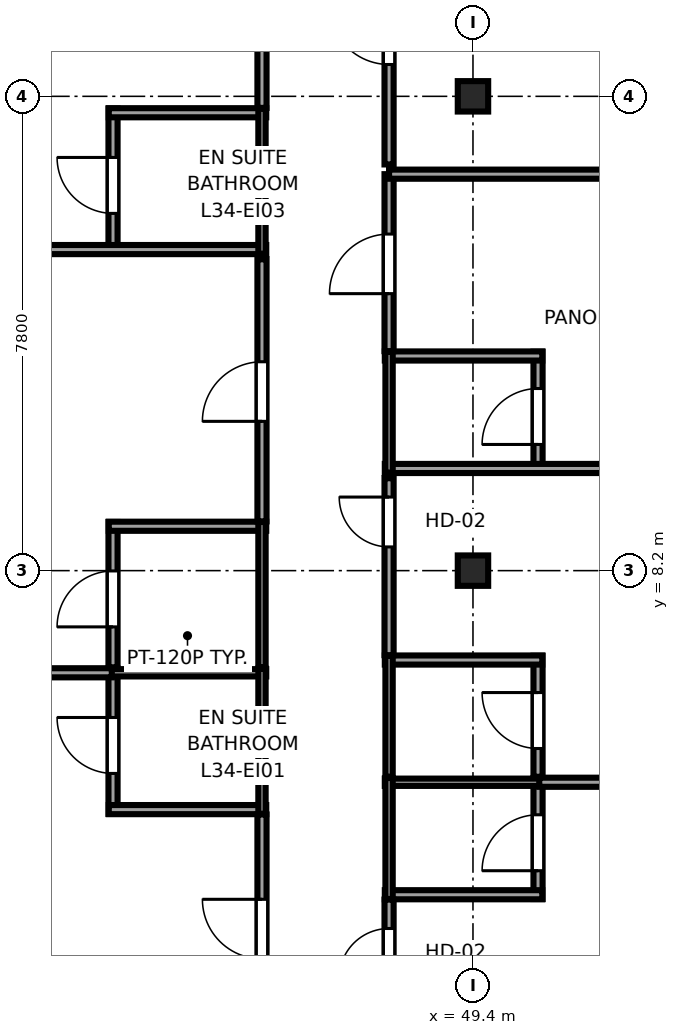
"""IFC4 building model, lengths in metres.
Left out: names, types, materials, properties, quantities, classifications, styles, units other than length and angle.
Written with IfcOpenShell. Run it as: python <this file> out.ifc"""

import sys

from ifc_helpers import new_model, si_unit, direction, frame, frame_2d, origin, origin_2d, place, context, subcontext, project, spatial, rectangle, i_section, extrude, source, transform, mapped, element, fill, save


model = new_model("IFC4")
c1 = context("Model", 3, precision=1e-05, world=origin(), true_north=direction((0.0, 1.0)))
c2 = subcontext(c1, "Body", "Model", "MODEL_VIEW")
j1 = project(units=[si_unit("LENGTHUNIT", "METRE"), si_unit("PLANEANGLEUNIT", "RADIAN")], contexts=[c1])
p1 = place(None, origin())
s1 = spatial("IfcSite", under=j1, at=p1, CompositionType="ELEMENT")
p2 = place(p1, origin())
s2 = spatial("IfcBuilding", under=s1, at=p2, CompositionType="ELEMENT")
p3 = place(p2, frame((0.0, 0.0, 132.85)))
s3 = spatial("IfcBuildingStorey", under=s2, at=p3, CompositionType="ELEMENT", Elevation=132.85)
m1 = source(origin(), c2, "Body", "SweptSolid", [
    extrude(i_section(OverallWidth=0.5, OverallDepth=0.5, WebThickness=0.022, FlangeThickness=0.034, at=origin_2d()), origin(), (0.0, 0.0, 1.0), 3.55),
])
for number, where, z_axis, x_axis in (
    (1, (49.4, 8.2, 0.0), (0.0, 0.0, 1.0), (1.0, 0.0, 0.0)),
    (2, (49.4, 16.0, 0.0), (0.0, 0.0, 1.0), (1.0, 0.0, 0.0)),
):
    element("IfcColumn", number, at=place(p3, frame(where, z_axis=z_axis, x_axis=x_axis)), inside=s3, PredefinedType="COLUMN", context=c2, shape_type="MappedRepresentation", body=[
        mapped(m1, transform((0.0, 0.0, 0.0), x_axis=(1.0, 0.0, 0.0), y_axis=(0.0, 1.0, 0.0), z_axis=(0.0, 0.0, 1.0), scale=1.0)),
    ])
p4 = place(p3, frame((43.48, 4.2, 0.0), z_axis=(0.0, 0.0, 1.0), x_axis=(0.0, 1.0, 0.0)))
e3 = element("IfcWall", 3, at=p4, inside=s3, PredefinedType="PARTITIONING", context=c2, shape_type="SweptSolid", body=[
    extrude(rectangle(XDim=2.39, YDim=0.15, at=frame_2d((1.195, 0.0))), origin(), (0.0, 0.0, 1.0), 3.37),
])
p5 = place(p4, frame((0.665, 0.0, 0.0)))
e4 = element("IfcOpeningElement", 4, at=p5, cuts=e3, PredefinedType="OPENING", context=c2, shape_type="SweptSolid", body=[
    extrude(rectangle(XDim=0.92, YDim=2.01, at=frame_2d((0.46, 1.005))), frame((0.0, 0.085, 0.0), z_axis=(0.0, -1.0, 0.0), x_axis=(1.0, 0.0, 0.0)), (0.0, 0.0, 1.0), 0.17),
])
p6 = place(p3, frame((43.41, 4.27, 0.0), z_axis=(0.0, 0.0, 1.0), x_axis=(1.0, 0.0, 0.0)))
e5 = element("IfcWall", 5, at=p6, inside=s3, PredefinedType="PARTITIONING", context=c2, shape_type="SweptSolid", body=[
    extrude(rectangle(XDim=2.59, YDim=0.15, at=frame_2d((1.295, 0.0))), origin(), (0.0, 0.0, 1.0), 3.37),
])
p7 = place(p3, frame((43.41, 6.52, 0.0), z_axis=(0.0, 0.0, 1.0), x_axis=(1.0, 0.0, 0.0)))
e6 = element("IfcWall", 6, at=p7, inside=s3, PredefinedType="PLUMBINGWALL", context=c2, shape_type="SweptSolid", body=[
    extrude(rectangle(XDim=2.59, YDim=0.12, at=frame_2d((1.295, 0.0))), origin(), (0.0, 0.0, 1.0), 3.37),
])
p8 = place(p3, frame((45.93, 4.2, 0.0), z_axis=(0.0, 0.0, 1.0), x_axis=(0.0, 1.0, 0.0)))
e7 = element("IfcWall", 7, at=p8, inside=s3, PredefinedType="PLUMBINGWALL", context=c2, shape_type="SweptSolid", body=[
    extrude(rectangle(XDim=2.39, YDim=0.12, at=frame_2d((1.195, 0.0))), origin(), (0.0, 0.0, 1.0), 3.37),
])
p9 = place(p3, frame((43.48, 6.61, 0.0), z_axis=(0.0, 0.0, 1.0), x_axis=(0.0, 1.0, 0.0)))
e8 = element("IfcWall", 8, at=p9, inside=s3, PredefinedType="PARTITIONING", context=c2, shape_type="SweptSolid", body=[
    extrude(rectangle(XDim=2.39, YDim=0.15, at=frame_2d((1.195, 0.0))), origin(), (0.0, 0.0, 1.0), 3.37),
])
p10 = place(p9, frame((0.665, 0.0, 0.0)))
e9 = element("IfcOpeningElement", 9, at=p10, cuts=e8, PredefinedType="OPENING", context=c2, shape_type="SweptSolid", body=[
    extrude(rectangle(XDim=0.92, YDim=2.01, at=frame_2d((0.46, 1.005))), frame((0.0, 0.085, 0.0), z_axis=(0.0, -1.0, 0.0), x_axis=(1.0, 0.0, 0.0)), (0.0, 0.0, 1.0), 0.17),
])
p11 = place(p3, frame((43.41, 8.93, 0.0), z_axis=(0.0, 0.0, 1.0), x_axis=(1.0, 0.0, 0.0)))
e10 = element("IfcWall", 10, at=p11, inside=s3, PredefinedType="PARTITIONING", context=c2, shape_type="SweptSolid", body=[
    extrude(rectangle(XDim=2.59, YDim=0.15, at=frame_2d((1.295, 0.0))), origin(), (0.0, 0.0, 1.0), 3.37),
])
p12 = place(p3, frame((45.93, 6.61, 0.0), z_axis=(0.0, 0.0, 1.0), x_axis=(0.0, 1.0, 0.0)))
e11 = element("IfcWall", 11, at=p12, inside=s3, PredefinedType="PLUMBINGWALL", context=c2, shape_type="SweptSolid", body=[
    extrude(rectangle(XDim=2.39, YDim=0.12, at=frame_2d((1.195, 0.0))), origin(), (0.0, 0.0, 1.0), 3.37),
])
p13 = place(p3, frame((43.48, 13.41, 0.0), z_axis=(0.0, 0.0, 1.0), x_axis=(0.0, 1.0, 0.0)))
e12 = element("IfcWall", 12, at=p13, inside=s3, PredefinedType="PARTITIONING", context=c2, shape_type="SweptSolid", body=[
    extrude(rectangle(XDim=2.39, YDim=0.15, at=frame_2d((1.195, 0.0))), origin(), (0.0, 0.0, 1.0), 3.37),
])
p14 = place(p13, frame((0.665, 0.0, 0.0)))
e13 = element("IfcOpeningElement", 13, at=p14, cuts=e12, PredefinedType="OPENING", context=c2, shape_type="SweptSolid", body=[
    extrude(rectangle(XDim=0.92, YDim=2.01, at=frame_2d((0.46, 1.005))), frame((0.0, 0.085, 0.0), z_axis=(0.0, -1.0, 0.0), x_axis=(1.0, 0.0, 0.0)), (0.0, 0.0, 1.0), 0.17),
])
p15 = place(p3, frame((34.65, 13.48, 0.0), z_axis=(0.0, 0.0, 1.0), x_axis=(1.0, 0.0, 0.0)))
e14 = element("IfcWall", 14, at=p15, inside=s3, PredefinedType="PARTITIONING", context=c2, shape_type="SweptSolid", body=[
    extrude(rectangle(XDim=11.35, YDim=0.15, at=frame_2d((5.675, 0.0))), origin(), (0.0, 0.0, 1.0), 3.37),
])
p16 = place(p3, frame((43.41, 15.73, 0.0), z_axis=(0.0, 0.0, 1.0), x_axis=(1.0, 0.0, 0.0)))
e15 = element("IfcWall", 15, at=p16, inside=s3, PredefinedType="PARTITIONING", context=c2, shape_type="SweptSolid", body=[
    extrude(rectangle(XDim=2.59, YDim=0.15, at=frame_2d((1.295, 0.0))), origin(), (0.0, 0.0, 1.0), 3.37),
])
p17 = place(p3, frame((45.93, 13.41, 0.0), z_axis=(0.0, 0.0, 1.0), x_axis=(0.0, 1.0, 0.0)))
e16 = element("IfcWall", 16, at=p17, inside=s3, PredefinedType="PLUMBINGWALL", context=c2, shape_type="SweptSolid", body=[
    extrude(rectangle(XDim=2.39, YDim=0.12, at=frame_2d((1.195, 0.0))), origin(), (0.0, 0.0, 1.0), 3.37),
])
p18 = place(p3, frame((50.47, 2.8, 0.0), z_axis=(0.0, 0.0, 1.0), x_axis=(0.0, 1.0, 0.0)))
e17 = element("IfcWall", 17, at=p18, inside=s3, PredefinedType="PARTITIONING", context=c2, shape_type="SweptSolid", body=[
    extrude(rectangle(XDim=1.99, YDim=0.15, at=frame_2d((0.995, 0.0))), origin(), (0.0, 0.0, 1.0), 3.37),
])
p19 = place(p18, frame((0.465, 0.0, 0.0)))
e18 = element("IfcOpeningElement", 18, at=p19, cuts=e17, PredefinedType="OPENING", context=c2, shape_type="SweptSolid", body=[
    extrude(rectangle(XDim=0.92, YDim=2.01, at=frame_2d((0.46, 1.005))), frame((0.0, 0.085, 0.0), z_axis=(0.0, -1.0, 0.0), x_axis=(1.0, 0.0, 0.0)), (0.0, 0.0, 1.0), 0.17),
])
p20 = place(p3, frame((47.95, 2.87, 0.0), z_axis=(0.0, 0.0, 1.0), x_axis=(1.0, 0.0, 0.0)))
e19 = element("IfcWall", 19, at=p20, inside=s3, PredefinedType="PARTITIONING", context=c2, shape_type="SweptSolid", body=[
    extrude(rectangle(XDim=2.59, YDim=0.15, at=frame_2d((1.295, 0.0))), origin(), (0.0, 0.0, 1.0), 3.37),
])
p21 = place(p3, frame((47.95, 4.72, 0.0), z_axis=(0.0, 0.0, 1.0), x_axis=(1.0, 0.0, 0.0)))
e20 = element("IfcWall", 20, at=p21, inside=s3, PredefinedType="PLUMBINGWALL", context=c2, shape_type="SweptSolid", body=[
    extrude(rectangle(XDim=2.59, YDim=0.12, at=frame_2d((1.295, 0.0))), origin(), (0.0, 0.0, 1.0), 3.37),
])
p22 = place(p3, frame((48.02, 2.8, 0.0), z_axis=(0.0, 0.0, 1.0), x_axis=(0.0, 1.0, 0.0)))
e21 = element("IfcWall", 21, at=p22, inside=s3, PredefinedType="PLUMBINGWALL", context=c2, shape_type="SweptSolid", body=[
    extrude(rectangle(XDim=1.99, YDim=0.12, at=frame_2d((0.995, 0.0))), origin(), (0.0, 0.0, 1.0), 3.37),
])
p23 = place(p3, frame((50.47, 4.81, 0.0), z_axis=(0.0, 0.0, 1.0), x_axis=(0.0, 1.0, 0.0)))
e22 = element("IfcWall", 22, at=p23, inside=s3, PredefinedType="PARTITIONING", context=c2, shape_type="SweptSolid", body=[
    extrude(rectangle(XDim=1.99, YDim=0.15, at=frame_2d((0.995, 0.0))), origin(), (0.0, 0.0, 1.0), 3.37),
])
p24 = place(p23, frame((0.465, 0.0, 0.0)))
e23 = element("IfcOpeningElement", 23, at=p24, cuts=e22, PredefinedType="OPENING", context=c2, shape_type="SweptSolid", body=[
    extrude(rectangle(XDim=0.92, YDim=2.01, at=frame_2d((0.46, 1.005))), frame((0.0, 0.085, 0.0), z_axis=(0.0, -1.0, 0.0), x_axis=(1.0, 0.0, 0.0)), (0.0, 0.0, 1.0), 0.17),
])
p25 = place(p3, frame((47.95, 6.73, 0.0), z_axis=(0.0, 0.0, 1.0), x_axis=(1.0, 0.0, 0.0)))
e24 = element("IfcWall", 24, at=p25, inside=s3, PredefinedType="PARTITIONING", context=c2, shape_type="SweptSolid", body=[
    extrude(rectangle(XDim=2.59, YDim=0.15, at=frame_2d((1.295, 0.0))), origin(), (0.0, 0.0, 1.0), 3.37),
])
p26 = place(p3, frame((48.02, 4.81, 0.0), z_axis=(0.0, 0.0, 1.0), x_axis=(0.0, 1.0, 0.0)))
e25 = element("IfcWall", 25, at=p26, inside=s3, PredefinedType="PLUMBINGWALL", context=c2, shape_type="SweptSolid", body=[
    extrude(rectangle(XDim=1.99, YDim=0.12, at=frame_2d((0.995, 0.0))), origin(), (0.0, 0.0, 1.0), 3.37),
])
p27 = place(p3, frame((50.47, 9.81, 0.0), z_axis=(0.0, 0.0, 1.0), x_axis=(0.0, 1.0, 0.0)))
e26 = element("IfcWall", 26, at=p27, inside=s3, PredefinedType="PARTITIONING", context=c2, shape_type="SweptSolid", body=[
    extrude(rectangle(XDim=1.99, YDim=0.15, at=frame_2d((0.995, 0.0))), origin(), (0.0, 0.0, 1.0), 3.37),
])
p28 = place(p27, frame((0.465, 0.0, 0.0)))
e27 = element("IfcOpeningElement", 27, at=p28, cuts=e26, PredefinedType="OPENING", context=c2, shape_type="SweptSolid", body=[
    extrude(rectangle(XDim=0.92, YDim=2.01, at=frame_2d((0.46, 1.005))), frame((0.0, 0.085, 0.0), z_axis=(0.0, -1.0, 0.0), x_axis=(1.0, 0.0, 0.0)), (0.0, 0.0, 1.0), 0.17),
])
p29 = place(p3, frame((47.95, 9.88, 0.0), z_axis=(0.0, 0.0, 1.0), x_axis=(1.0, 0.0, 0.0)))
e28 = element("IfcWall", 28, at=p29, inside=s3, PredefinedType="PARTITIONING", context=c2, shape_type="SweptSolid", body=[
    extrude(rectangle(XDim=8.645, YDim=0.15, at=frame_2d((4.323, 0.0))), origin(), (0.0, 0.0, 1.0), 3.37),
])
p30 = place(p3, frame((47.95, 11.73, 0.0), z_axis=(0.0, 0.0, 1.0), x_axis=(1.0, 0.0, 0.0)))
e29 = element("IfcWall", 29, at=p30, inside=s3, PredefinedType="PARTITIONING", context=c2, shape_type="SweptSolid", body=[
    extrude(rectangle(XDim=2.59, YDim=0.15, at=frame_2d((1.295, 0.0))), origin(), (0.0, 0.0, 1.0), 3.37),
])
p31 = place(p3, frame((48.02, 9.81, 0.0), z_axis=(0.0, 0.0, 1.0), x_axis=(0.0, 1.0, 0.0)))
e30 = element("IfcWall", 30, at=p31, inside=s3, PredefinedType="PLUMBINGWALL", context=c2, shape_type="SweptSolid", body=[
    extrude(rectangle(XDim=1.99, YDim=0.12, at=frame_2d((0.995, 0.0))), origin(), (0.0, 0.0, 1.0), 3.37),
])
p32 = place(p3, frame((45.93, 0.405, 0.0), z_axis=(0.0, 0.0, 1.0), x_axis=(0.0, 1.0, 0.0)))
e31 = element("IfcWall", 31, at=p32, inside=s3, PredefinedType="PARTITIONING", context=c2, shape_type="SweptSolid", body=[
    extrude(rectangle(XDim=3.785, YDim=0.15, at=frame_2d((1.893, 0.0))), origin(), (0.0, 0.0, 1.0), 3.37),
])
p33 = place(p32, frame((1.41, 0.0, 0.0)))
e32 = element("IfcOpeningElement", 32, at=p33, cuts=e31, PredefinedType="OPENING", context=c2, shape_type="SweptSolid", body=[
    extrude(rectangle(XDim=0.98, YDim=2.12, at=frame_2d((0.49, 1.06))), frame((0.0, 0.085, 0.0), z_axis=(0.0, -1.0, 0.0), x_axis=(1.0, 0.0, 0.0)), (0.0, 0.0, 1.0), 0.17),
])
p34 = place(p3, frame((34.65, 6.52, 0.0), z_axis=(0.0, 0.0, 1.0), x_axis=(1.0, 0.0, 0.0)))
e33 = element("IfcWall", 33, at=p34, inside=s3, PredefinedType="PARTITIONING", context=c2, shape_type="SweptSolid", body=[
    extrude(rectangle(XDim=8.81, YDim=0.15, at=frame_2d((4.405, 0.0))), origin(), (0.0, 0.0, 1.0), 3.37),
])
p35 = place(p3, frame((45.93, 9.01, 0.0), z_axis=(0.0, 0.0, 1.0), x_axis=(0.0, 1.0, 0.0)))
e34 = element("IfcWall", 34, at=p35, inside=s3, PredefinedType="PARTITIONING", context=c2, shape_type="SweptSolid", body=[
    extrude(rectangle(XDim=4.31, YDim=0.15, at=frame_2d((2.155, 0.0))), origin(), (0.0, 0.0, 1.0), 3.37),
])
p36 = place(p35, frame((1.645, 0.0, 0.0)))
e35 = element("IfcOpeningElement", 35, at=p36, cuts=e34, PredefinedType="OPENING", context=c2, shape_type="SweptSolid", body=[
    extrude(rectangle(XDim=0.98, YDim=2.12, at=frame_2d((0.49, 1.06))), frame((0.0, 0.085, 0.0), z_axis=(0.0, -1.0, 0.0), x_axis=(1.0, 0.0, 0.0)), (0.0, 0.0, 1.0), 0.17),
])
p37 = place(p3, frame((45.93, 15.81, 0.0), z_axis=(0.0, 0.0, 1.0), x_axis=(0.0, 1.0, 0.0)))
e36 = element("IfcWall", 36, at=p37, inside=s3, PredefinedType="PARTITIONING", context=c2, shape_type="SweptSolid", body=[
    extrude(rectangle(XDim=4.21, YDim=0.15, at=frame_2d((2.105, 0.0))), origin(), (0.0, 0.0, 1.0), 3.37),
])
p38 = place(p37, frame((1.595, 0.0, 0.0)))
e37 = element("IfcOpeningElement", 37, at=p38, cuts=e36, PredefinedType="OPENING", context=c2, shape_type="SweptSolid", body=[
    extrude(rectangle(XDim=0.98, YDim=2.12, at=frame_2d((0.49, 1.06))), frame((0.0, 0.085, 0.0), z_axis=(0.0, -1.0, 0.0), x_axis=(1.0, 0.0, 0.0)), (0.0, 0.0, 1.0), 0.17),
])
p39 = place(p3, frame((48.02, 0.405, 0.0), z_axis=(0.0, 0.0, 1.0), x_axis=(0.0, 1.0, 0.0)))
e38 = element("IfcWall", 38, at=p39, inside=s3, PredefinedType="PARTITIONING", context=c2, shape_type="SweptSolid", body=[
    extrude(rectangle(XDim=2.385, YDim=0.15, at=frame_2d((1.192, 0.0))), origin(), (0.0, 0.0, 1.0), 3.37),
])
p40 = place(p39, frame((1.09, 0.0, 0.0)))
e39 = element("IfcOpeningElement", 39, at=p40, cuts=e38, PredefinedType="OPENING", context=c2, shape_type="SweptSolid", body=[
    extrude(rectangle(XDim=0.82, YDim=2.01, at=frame_2d((0.41, 1.005))), frame((0.0, 0.085, 0.0), z_axis=(0.0, -1.0, 0.0), x_axis=(1.0, 0.0, 0.0)), (0.0, 0.0, 1.0), 0.17),
])
p41 = place(p3, frame((50.49, 4.72, 0.0), z_axis=(0.0, 0.0, 1.0), x_axis=(1.0, 0.0, 0.0)))
e40 = element("IfcWall", 40, at=p41, inside=s3, PredefinedType="PARTITIONING", context=c2, shape_type="SweptSolid", body=[
    extrude(rectangle(XDim=6.105, YDim=0.15, at=frame_2d((3.052, 0.0))), origin(), (0.0, 0.0, 1.0), 3.37),
])
p42 = place(p3, frame((48.02, 6.81, 0.0), z_axis=(0.0, 0.0, 1.0), x_axis=(0.0, 1.0, 0.0)))
e41 = element("IfcWall", 41, at=p42, inside=s3, PredefinedType="PARTITIONING", context=c2, shape_type="SweptSolid", body=[
    extrude(rectangle(XDim=2.91, YDim=0.15, at=frame_2d((1.455, 0.0))), origin(), (0.0, 0.0, 1.0), 3.37),
])
p43 = place(p42, frame((1.78, 0.0, 0.0)))
e42 = element("IfcOpeningElement", 42, at=p43, cuts=e41, PredefinedType="OPENING", context=c2, shape_type="SweptSolid", body=[
    extrude(rectangle(XDim=0.82, YDim=2.01, at=frame_2d((0.41, 1.005))), frame((0.0, 0.085, 0.0), z_axis=(0.0, -1.0, 0.0), x_axis=(1.0, 0.0, 0.0)), (0.0, 0.0, 1.0), 0.17),
])
p44 = place(p3, frame((48.02, 11.81, 0.0), z_axis=(0.0, 0.0, 1.0), x_axis=(0.0, 1.0, 0.0)))
e43 = element("IfcWall", 43, at=p44, inside=s3, PredefinedType="PARTITIONING", context=c2, shape_type="SweptSolid", body=[
    extrude(rectangle(XDim=2.91, YDim=0.15, at=frame_2d((1.455, 0.0))), origin(), (0.0, 0.0, 1.0), 3.37),
])
p45 = place(p44, frame((0.945, 0.0, 0.0)))
e44 = element("IfcOpeningElement", 44, at=p45, cuts=e43, PredefinedType="OPENING", context=c2, shape_type="SweptSolid", body=[
    extrude(rectangle(XDim=0.98, YDim=2.12, at=frame_2d((0.49, 1.06))), frame((0.0, 0.085, 0.0), z_axis=(0.0, -1.0, 0.0), x_axis=(1.0, 0.0, 0.0)), (0.0, 0.0, 1.0), 0.17),
])
p46 = place(p3, frame((48.02, 14.72, 0.0), z_axis=(0.0, 0.0, 1.0), x_axis=(1.0, 0.0, 0.0)))
e45 = element("IfcWall", 45, at=p46, inside=s3, PredefinedType="PARTITIONING", context=c2, shape_type="SweptSolid", body=[
    extrude(rectangle(XDim=8.575, YDim=0.15, at=frame_2d((4.288, 0.0))), origin(), (0.0, 0.0, 1.0), 3.37),
])
p47 = place(p3, frame((48.02, 14.88, 0.0), z_axis=(0.0, 0.0, 1.0), x_axis=(0.0, 1.0, 0.0)))
e46 = element("IfcWall", 46, at=p47, inside=s3, PredefinedType="PARTITIONING", context=c2, shape_type="SweptSolid", body=[
    extrude(rectangle(XDim=3.107, YDim=0.15, at=frame_2d((1.554, 0.0))), origin(), (0.0, 0.0, 1.0), 3.37),
])
p48 = place(p47, frame((1.644, 0.0, 0.0)))
e47 = element("IfcOpeningElement", 47, at=p48, cuts=e46, PredefinedType="OPENING", context=c2, shape_type="SweptSolid", body=[
    extrude(rectangle(XDim=0.98, YDim=2.12, at=frame_2d((0.49, 1.06))), frame((0.0, 0.085, 0.0), z_axis=(0.0, -1.0, 0.0), x_axis=(1.0, 0.0, 0.0)), (0.0, 0.0, 1.0), 0.17),
])
m2 = source(origin(), c2, "Body", "SweptSolid", [
    extrude(rectangle(XDim=0.92, YDim=2.01, at=frame_2d((0.46, 1.005))), frame((0.0, 0.025, 0.0), z_axis=(0.0, -1.0, 0.0), x_axis=(1.0, 0.0, 0.0)), (0.0, 0.0, 1.0), 0.05),
])
p49 = place(p5, origin())
e48 = element("IfcDoor", 48, at=p49, inside=s3, OperationType="SINGLE_SWING_RIGHT", PredefinedType="DOOR", context=c2, shape_type="MappedRepresentation", body=[
    mapped(m2, transform((0.0, 0.0, 0.0), x_axis=(1.0, 0.0, 0.0), y_axis=(0.0, 1.0, 0.0), z_axis=(0.0, 0.0, 1.0), scale=1.0)),
])
fill(e4, e48)
p50 = place(p10, origin())
e49 = element("IfcDoor", 49, at=p50, inside=s3, OperationType="SINGLE_SWING_LEFT", PredefinedType="DOOR", context=c2, shape_type="MappedRepresentation", body=[
    mapped(m2, transform((0.0, 0.0, 0.0), x_axis=(1.0, 0.0, 0.0), y_axis=(0.0, 1.0, 0.0), z_axis=(0.0, 0.0, 1.0), scale=1.0)),
])
fill(e9, e49)
p51 = place(p14, origin())
e50 = element("IfcDoor", 50, at=p51, inside=s3, OperationType="SINGLE_SWING_RIGHT", PredefinedType="DOOR", context=c2, shape_type="MappedRepresentation", body=[
    mapped(m2, transform((0.0, 0.0, 0.0), x_axis=(1.0, 0.0, 0.0), y_axis=(0.0, 1.0, 0.0), z_axis=(0.0, 0.0, 1.0), scale=1.0)),
])
fill(e13, e50)
p52 = place(p19, origin())
e51 = element("IfcDoor", 51, at=p52, inside=s3, OperationType="SINGLE_SWING_LEFT", PredefinedType="DOOR", context=c2, shape_type="MappedRepresentation", body=[
    mapped(m2, transform((0.0, 0.0, 0.0), x_axis=(1.0, 0.0, 0.0), y_axis=(0.0, 1.0, 0.0), z_axis=(0.0, 0.0, 1.0), scale=1.0)),
])
fill(e18, e51)
p53 = place(p24, origin())
e52 = element("IfcDoor", 52, at=p53, inside=s3, OperationType="SINGLE_SWING_RIGHT", PredefinedType="DOOR", context=c2, shape_type="MappedRepresentation", body=[
    mapped(m2, transform((0.0, 0.0, 0.0), x_axis=(1.0, 0.0, 0.0), y_axis=(0.0, 1.0, 0.0), z_axis=(0.0, 0.0, 1.0), scale=1.0)),
])
fill(e23, e52)
p54 = place(p28, origin())
e53 = element("IfcDoor", 53, at=p54, inside=s3, OperationType="SINGLE_SWING_LEFT", PredefinedType="DOOR", context=c2, shape_type="MappedRepresentation", body=[
    mapped(m2, transform((0.0, 0.0, 0.0), x_axis=(1.0, 0.0, 0.0), y_axis=(0.0, 1.0, 0.0), z_axis=(0.0, 0.0, 1.0), scale=1.0)),
])
fill(e27, e53)
m3 = source(origin(), c2, "Body", "SweptSolid", [
    extrude(rectangle(XDim=0.98, YDim=2.12, at=frame_2d((0.49, 1.06))), frame((0.0, 0.025, 0.0), z_axis=(0.0, -1.0, 0.0), x_axis=(1.0, 0.0, 0.0)), (0.0, 0.0, 1.0), 0.05),
])
p55 = place(p33, origin())
e54 = element("IfcDoor", 54, at=p55, inside=s3, OperationType="SINGLE_SWING_RIGHT", PredefinedType="DOOR", context=c2, shape_type="MappedRepresentation", body=[
    mapped(m3, transform((0.0, 0.0, 0.0), x_axis=(1.0, 0.0, 0.0), y_axis=(0.0, 1.0, 0.0), z_axis=(0.0, 0.0, 1.0), scale=1.0)),
])
fill(e32, e54)
p56 = place(p36, origin())
e55 = element("IfcDoor", 55, at=p56, inside=s3, OperationType="SINGLE_SWING_LEFT", PredefinedType="DOOR", context=c2, shape_type="MappedRepresentation", body=[
    mapped(m3, transform((0.0, 0.0, 0.0), x_axis=(1.0, 0.0, 0.0), y_axis=(0.0, 1.0, 0.0), z_axis=(0.0, 0.0, 1.0), scale=1.0)),
])
fill(e35, e55)
m4 = source(origin(), c2, "Body", "SweptSolid", [
    extrude(rectangle(XDim=0.82, YDim=2.01, at=frame_2d((0.41, 1.005))), frame((0.0, 0.025, 0.0), z_axis=(0.0, -1.0, 0.0), x_axis=(1.0, 0.0, 0.0)), (0.0, 0.0, 1.0), 0.05),
])
p57 = place(p40, origin())
e56 = element("IfcDoor", 56, at=p57, inside=s3, OperationType="SINGLE_SWING_LEFT", PredefinedType="DOOR", context=c2, shape_type="MappedRepresentation", body=[
    mapped(m4, transform((0.0, 0.0, 0.0), x_axis=(1.0, 0.0, 0.0), y_axis=(0.0, 1.0, 0.0), z_axis=(0.0, 0.0, 1.0), scale=1.0)),
])
fill(e39, e56)
p58 = place(p43, origin())
e57 = element("IfcDoor", 57, at=p58, inside=s3, OperationType="SINGLE_SWING_RIGHT", PredefinedType="DOOR", context=c2, shape_type="MappedRepresentation", body=[
    mapped(m4, transform((0.0, 0.0, 0.0), x_axis=(1.0, 0.0, 0.0), y_axis=(0.0, 1.0, 0.0), z_axis=(0.0, 0.0, 1.0), scale=1.0)),
])
fill(e42, e57)
p59 = place(p45, origin())
e58 = element("IfcDoor", 58, at=p59, inside=s3, OperationType="SINGLE_SWING_LEFT", PredefinedType="DOOR", context=c2, shape_type="MappedRepresentation", body=[
    mapped(m3, transform((0.0, 0.0, 0.0), x_axis=(1.0, 0.0, 0.0), y_axis=(0.0, 1.0, 0.0), z_axis=(0.0, 0.0, 1.0), scale=1.0)),
])
fill(e44, e58)
p60 = place(p48, origin())
e59 = element("IfcDoor", 59, at=p60, inside=s3, OperationType="SINGLE_SWING_RIGHT", PredefinedType="DOOR", context=c2, shape_type="MappedRepresentation", body=[
    mapped(m3, transform((0.0, 0.0, 0.0), x_axis=(1.0, 0.0, 0.0), y_axis=(0.0, 1.0, 0.0), z_axis=(0.0, 0.0, 1.0), scale=1.0)),
])
fill(e47, e59)
save(model, sys.argv[1])
